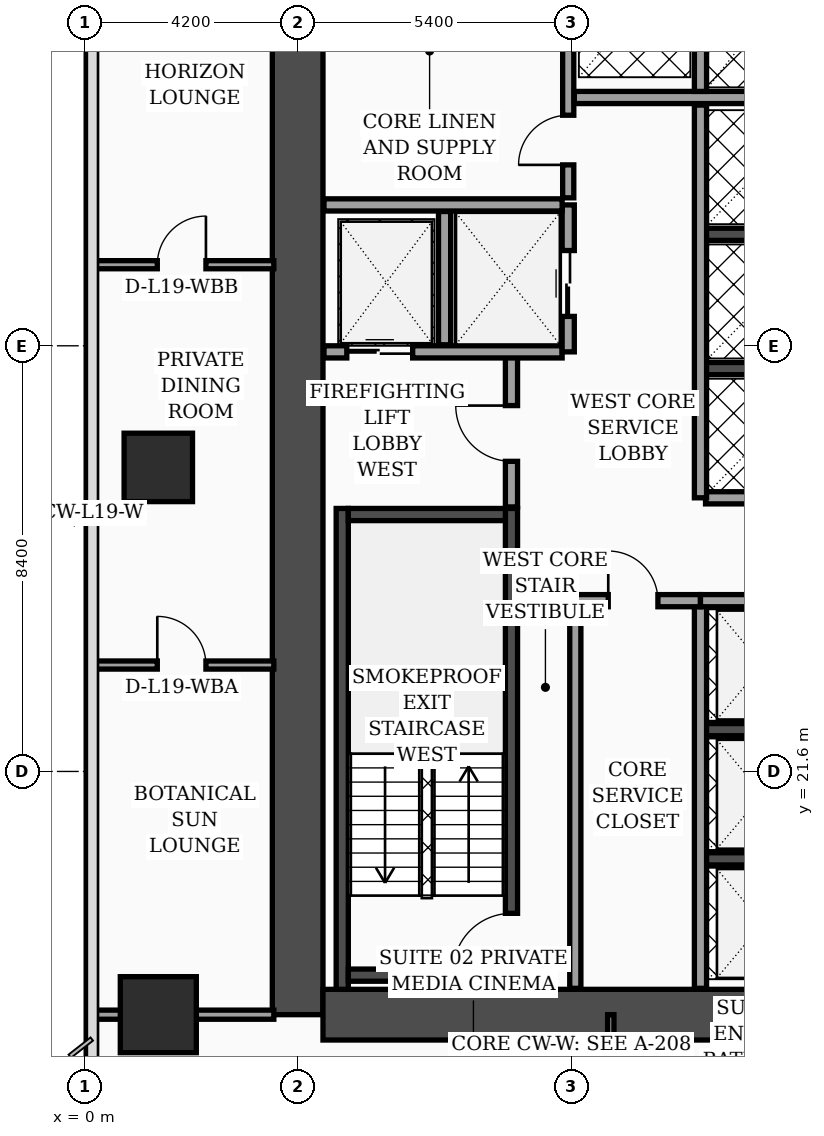
"""IFC4 building model, lengths in metres.
Left out: names, types, materials, properties, quantities, classifications, styles, units other than length and angle.
Written with IfcOpenShell. Run it as: python <this file> out.ifc"""

import sys

from ifc_helpers import new_model, si_unit, direction, frame, frame_2d, origin, origin_2d, place, context, subcontext, project, spatial, rectangle, extrude, element, fill, save


model = new_model("IFC4")
c1 = context("Model", 3, precision=1e-05, world=origin(), true_north=direction((0.0, 1.0)))
c2 = subcontext(c1, "Body", "Model", "MODEL_VIEW")
j1 = project(units=[si_unit("LENGTHUNIT", "METRE"), si_unit("PLANEANGLEUNIT", "RADIAN")], contexts=[c1])
p1 = place(None, origin())
s1 = spatial("IfcSite", under=j1, at=p1, CompositionType="ELEMENT")
p2 = place(p1, origin())
s2 = spatial("IfcBuilding", under=s1, at=p2, CompositionType="ELEMENT")
p3 = place(p2, frame((0.0, 0.0, 81.2)))
s3 = spatial("IfcBuildingStorey", under=s2, at=p3, CompositionType="ELEMENT", Elevation=81.2)
p4 = place(p3, frame((4.2, 16.8, 0.0), z_axis=(0.0, 0.0, 1.0), x_axis=(0.0, 1.0, 0.0)))
e1 = element("IfcWall", 1, at=p4, inside=s3, PredefinedType="SHEAR", context=c2, shape_type="SweptSolid", body=[
    extrude(rectangle(XDim=21.6, YDim=1.0, at=frame_2d((10.8, 0.0))), origin(), (0.0, 0.0, 1.0), 3.56),
])
p5 = place(p3, frame((4.7, 16.8, 0.0), z_axis=(0.0, 0.0, 1.0), x_axis=(1.0, 0.0, 0.0)))
e2 = element("IfcWall", 2, at=p5, inside=s3, PredefinedType="SHEAR", context=c2, shape_type="SweptSolid", body=[
    extrude(rectangle(XDim=9.8, YDim=1.0, at=frame_2d((4.9, 0.0))), origin(), (0.0, 0.0, 1.0), 3.56),
])
p6 = place(p3, frame((5.08, 17.3, 0.0), z_axis=(0.0, 0.0, 1.0), x_axis=(0.0, 1.0, 0.0)))
e3 = element("IfcWall", 3, at=p6, inside=s3, PredefinedType="SOLIDWALL", context=c2, shape_type="SweptSolid", body=[
    extrude(rectangle(XDim=9.49, YDim=0.24, at=frame_2d((4.745, 0.0))), origin(), (0.0, 0.0, 1.0), 3.56),
])
p7 = place(p3, frame((8.42, 17.3, 0.0), z_axis=(0.0, 0.0, 1.0), x_axis=(0.0, 1.0, 0.0)))
e4 = element("IfcWall", 4, at=p7, inside=s3, PredefinedType="SOLIDWALL", context=c2, shape_type="SweptSolid", body=[
    extrude(rectangle(XDim=9.49, YDim=0.24, at=frame_2d((4.745, 0.0))), origin(), (0.0, 0.0, 1.0), 3.56),
])
p8 = place(p7, frame((0.35, 0.0, 0.0)))
e5 = element("IfcOpeningElement", 5, at=p8, cuts=e4, PredefinedType="OPENING", context=c2, shape_type="SweptSolid", body=[
    extrude(rectangle(XDim=1.15, YDim=2.2, at=frame_2d((0.575, 1.1))), frame((0.0, 0.13, 0.0), z_axis=(0.0, -1.0, 0.0), x_axis=(1.0, 0.0, 0.0)), (0.0, 0.0, 1.0), 0.26),
])
for number, where, z_axis, x_axis in (
    (6, (5.2, 17.58, 0.0), (0.0, 0.0, 1.0), (1.0, 0.0, 0.0)),
    (7, (5.2, 26.67, 0.0), (0.0, 0.0, 1.0), (1.0, 0.0, 0.0)),
):
    element("IfcWall", number, at=place(p3, frame(where, z_axis=z_axis, x_axis=x_axis)), inside=s3, PredefinedType="SOLIDWALL", context=c2, shape_type="SweptSolid", body=[
        extrude(rectangle(XDim=3.1, YDim=0.24, at=frame_2d((1.55, 0.0))), origin(), (0.0, 0.0, 1.0), 3.56),
    ])
for number, where, z_axis, x_axis in (
    (8, (12.18, 19.875, 0.0), (0.0, 0.0, 1.0), (1.0, 0.0, 0.0)),
    (9, (12.18, 22.425, 0.0), (0.0, 0.0, 1.0), (1.0, 0.0, 0.0)),
    (10, (12.18, 29.55, 0.0), (0.0, 0.0, 1.0), (1.0, 0.0, 0.0)),
    (11, (12.18, 32.2, 0.0), (0.0, 0.0, 1.0), (1.0, 0.0, 0.0)),
):
    element("IfcWall", number, at=place(p3, frame(where, z_axis=z_axis, x_axis=x_axis)), inside=s3, PredefinedType="SOLIDWALL", context=c2, shape_type="SweptSolid", body=[
        extrude(rectangle(XDim=2.32, YDim=0.24, at=frame_2d((1.16, 0.0))), origin(), (0.0, 0.0, 1.0), 3.56),
    ])
p9 = place(p3, frame((1.45, 16.8, 0.0), z_axis=(0.0, 0.0, 1.0), x_axis=(1.0, 0.0, 0.0)))
e12 = element("IfcColumn", 12, at=p9, inside=s3, PredefinedType="COLUMN", context=c2, shape_type="SweptSolid", body=[
    extrude(rectangle(XDim=1.5, YDim=1.5, at=origin_2d()), origin(), (0.0, 0.0, 1.0), 3.56),
])
p10 = place(p3, frame((1.45, 27.6, 0.0), z_axis=(0.0, 0.0, 1.0), x_axis=(1.0, 0.0, 0.0)))
e13 = element("IfcColumn", 13, at=p10, inside=s3, PredefinedType="COLUMN", context=c2, shape_type="SweptSolid", body=[
    extrude(rectangle(XDim=1.35, YDim=1.35, at=origin_2d()), origin(), (0.0, 0.0, 1.0), 3.56),
])
p11 = place(p3, frame((8.42, 26.82, 0.0), z_axis=(0.0, 0.0, 1.0), x_axis=(0.0, 1.0, 0.0)))
e14 = element("IfcWall", 14, at=p11, inside=s3, PredefinedType="SOLIDWALL", context=c2, shape_type="SweptSolid", body=[
    extrude(rectangle(XDim=3.0, YDim=0.24, at=frame_2d((1.5, 0.0))), origin(), (0.0, 0.0, 1.0), 3.56),
])
p12 = place(p11, frame((0.9, 0.0, 0.0)))
e15 = element("IfcOpeningElement", 15, at=p12, cuts=e14, PredefinedType="OPENING", context=c2, shape_type="SweptSolid", body=[
    extrude(rectangle(XDim=1.1, YDim=2.2, at=frame_2d((0.55, 1.1))), frame((0.0, 0.13, 0.0), z_axis=(0.0, -1.0, 0.0), x_axis=(1.0, 0.0, 0.0)), (0.0, 0.0, 1.0), 0.26),
])
p13 = place(p3, frame((4.72, 29.88, 0.0), z_axis=(0.0, 0.0, 1.0), x_axis=(1.0, 0.0, 0.0)))
e16 = element("IfcWall", 16, at=p13, inside=s3, PredefinedType="SOLIDWALL", context=c2, shape_type="SweptSolid", body=[
    extrude(rectangle(XDim=4.7, YDim=0.24, at=frame_2d((2.35, 0.0))), origin(), (0.0, 0.0, 1.0), 3.56),
])
p14 = place(p13, frame((0.45, 0.0, 0.0)))
e17 = element("IfcOpeningElement", 17, at=p14, cuts=e16, PredefinedType="OPENING", context=c2, shape_type="SweptSolid", body=[
    extrude(rectangle(XDim=1.3, YDim=2.35, at=frame_2d((0.65, 1.175))), frame((0.0, 0.13, 0.0), z_axis=(0.0, -1.0, 0.0), x_axis=(1.0, 0.0, 0.0)), (0.0, 0.0, 1.0), 0.26),
])
p15 = place(p3, frame((7.1, 30.02, 0.0), z_axis=(0.0, 0.0, 1.0), x_axis=(0.0, 1.0, 0.0)))
e18 = element("IfcWall", 18, at=p15, inside=s3, PredefinedType="SOLIDWALL", context=c2, shape_type="SweptSolid", body=[
    extrude(rectangle(XDim=2.63, YDim=0.24, at=frame_2d((1.315, 0.0))), origin(), (0.0, 0.0, 1.0), 3.56),
])
p16 = place(p3, frame((9.54, 29.88, 0.0), z_axis=(0.0, 0.0, 1.0), x_axis=(0.0, 1.0, 0.0)))
e19 = element("IfcWall", 19, at=p16, inside=s3, PredefinedType="SOLIDWALL", context=c2, shape_type="SweptSolid", body=[
    extrude(rectangle(XDim=2.9, YDim=0.24, at=frame_2d((1.45, 0.0))), origin(), (0.0, 0.0, 1.0), 3.56),
])
p17 = place(p16, frame((0.7, 0.0, 0.0)))
e20 = element("IfcOpeningElement", 20, at=p17, cuts=e19, PredefinedType="OPENING", context=c2, shape_type="SweptSolid", body=[
    extrude(rectangle(XDim=1.3, YDim=2.35, at=frame_2d((0.65, 1.175))), frame((0.0, 0.13, 0.0), z_axis=(0.0, -1.0, 0.0), x_axis=(1.0, 0.0, 0.0)), (0.0, 0.0, 1.0), 0.26),
])
p18 = place(p3, frame((4.72, 32.78, 0.0), z_axis=(0.0, 0.0, 1.0), x_axis=(1.0, 0.0, 0.0)))
e21 = element("IfcWall", 21, at=p18, inside=s3, PredefinedType="SOLIDWALL", context=c2, shape_type="SweptSolid", body=[
    extrude(rectangle(XDim=4.7, YDim=0.24, at=frame_2d((2.35, 0.0))), origin(), (0.0, 0.0, 1.0), 3.56),
])
p19 = place(p3, frame((9.68, 17.32, 0.0), z_axis=(0.0, 0.0, 1.0), x_axis=(0.0, 1.0, 0.0)))
e22 = element("IfcWall", 22, at=p19, inside=s3, PredefinedType="SOLIDWALL", context=c2, shape_type="SweptSolid", body=[
    extrude(rectangle(XDim=7.68, YDim=0.22, at=frame_2d((3.84, 0.0))), origin(), (0.0, 0.0, 1.0), 3.56),
])
p20 = place(p3, frame((9.54, 32.92, 0.0), z_axis=(0.0, 0.0, 1.0), x_axis=(0.0, 1.0, 0.0)))
e23 = element("IfcWall", 23, at=p20, inside=s3, PredefinedType="SOLIDWALL", context=c2, shape_type="SweptSolid", body=[
    extrude(rectangle(XDim=4.96, YDim=0.22, at=frame_2d((2.48, 0.0))), origin(), (0.0, 0.0, 1.0), 3.56),
])
p21 = place(p20, frame((0.65, 0.0, 0.0)))
e24 = element("IfcOpeningElement", 24, at=p21, cuts=e23, PredefinedType="OPENING", context=c2, shape_type="SweptSolid", body=[
    extrude(rectangle(XDim=0.98, YDim=2.15, at=frame_2d((0.49, 1.075))), frame((0.0, 0.12, 0.0), z_axis=(0.0, -1.0, 0.0), x_axis=(1.0, 0.0, 0.0)), (0.0, 0.0, 1.0), 0.24),
])
p22 = place(p3, frame((12.15, 17.32, 0.0), z_axis=(0.0, 0.0, 1.0), x_axis=(0.0, 1.0, 0.0)))
e25 = element("IfcWall", 25, at=p22, inside=s3, PredefinedType="SOLIDWALL", context=c2, shape_type="SweptSolid", body=[
    extrude(rectangle(XDim=7.65, YDim=0.24, at=frame_2d((3.825, 0.0))), origin(), (0.0, 0.0, 1.0), 3.56),
])
p23 = place(p3, frame((9.68, 24.97, 0.0), z_axis=(0.0, 0.0, 1.0), x_axis=(1.0, 0.0, 0.0)))
e26 = element("IfcWall", 26, at=p23, inside=s3, PredefinedType="SOLIDWALL", context=c2, shape_type="SweptSolid", body=[
    extrude(rectangle(XDim=2.47, YDim=0.24, at=frame_2d((1.235, 0.0))), origin(), (0.0, 0.0, 1.0), 3.56),
])
p24 = place(p23, frame((0.65, 0.0, 0.0)))
e27 = element("IfcOpeningElement", 27, at=p24, cuts=e26, PredefinedType="OPENING", context=c2, shape_type="SweptSolid", body=[
    extrude(rectangle(XDim=0.98, YDim=2.15, at=frame_2d((0.49, 1.075))), frame((0.0, 0.13, 0.0), z_axis=(0.0, -1.0, 0.0), x_axis=(1.0, 0.0, 0.0)), (0.0, 0.0, 1.0), 0.26),
])
p25 = place(p3, frame((12.15, 24.97, 0.0), z_axis=(0.0, 0.0, 1.0), x_axis=(1.0, 0.0, 0.0)))
e28 = element("IfcWall", 28, at=p25, inside=s3, PredefinedType="SOLIDWALL", context=c2, shape_type="SweptSolid", body=[
    extrude(rectangle(XDim=2.33, YDim=0.24, at=frame_2d((1.165, 0.0))), origin(), (0.0, 0.0, 1.0), 2.84),
])
p26 = place(p3, frame((12.25, 27.0, 0.0), z_axis=(0.0, 0.0, 1.0), x_axis=(1.0, 0.0, 0.0)))
e29 = element("IfcWall", 29, at=p26, inside=s3, PredefinedType="SOLIDWALL", context=c2, shape_type="SweptSolid", body=[
    extrude(rectangle(XDim=2.23, YDim=0.24, at=frame_2d((1.115, 0.0))), origin(), (0.0, 0.0, 1.0), 3.56),
])
p27 = place(p3, frame((12.15, 27.0, 0.0), z_axis=(0.0, 0.0, 1.0), x_axis=(0.0, 1.0, 0.0)))
e30 = element("IfcWall", 30, at=p27, inside=s3, PredefinedType="SOLIDWALL", context=c2, shape_type="SweptSolid", body=[
    extrude(rectangle(XDim=7.75, YDim=0.24, at=frame_2d((3.875, 0.0))), origin(), (0.0, 0.0, 1.0), 3.56),
])
p28 = place(p3, frame((9.66, 34.9, 0.0), z_axis=(0.0, 0.0, 1.0), x_axis=(1.0, 0.0, 0.0)))
e31 = element("IfcWall", 31, at=p28, inside=s3, PredefinedType="SOLIDWALL", context=c2, shape_type="SweptSolid", body=[
    extrude(rectangle(XDim=4.82, YDim=0.24, at=frame_2d((2.41, 0.0))), origin(), (0.0, 0.0, 1.0), 3.56),
])
p29 = place(p3, frame((12.15, 35.02, 0.0), z_axis=(0.0, 0.0, 1.0), x_axis=(0.0, 1.0, 0.0)))
e32 = element("IfcWall", 32, at=p29, inside=s3, PredefinedType="SOLIDWALL", context=c2, shape_type="SweptSolid", body=[
    extrude(rectangle(XDim=2.86, YDim=0.24, at=frame_2d((1.43, 0.0))), origin(), (0.0, 0.0, 1.0), 3.56),
])
p30 = place(p3, frame((0.08, 23.7, 0.0), z_axis=(0.0, 0.0, 1.0), x_axis=(1.0, 0.0, 0.0)))
e33 = element("IfcWall", 33, at=p30, inside=s3, PredefinedType="PARTITIONING", context=c2, shape_type="SweptSolid", body=[
    extrude(rectangle(XDim=3.65, YDim=0.16, at=frame_2d((1.825, 0.0))), origin(), (0.0, 0.0, 1.0), 3.04),
])
p31 = place(p30, frame((1.35, 0.0, 0.0)))
e34 = element("IfcOpeningElement", 34, at=p31, cuts=e33, PredefinedType="OPENING", context=c2, shape_type="SweptSolid", body=[
    extrude(rectangle(XDim=0.96, YDim=2.2, at=frame_2d((0.48, 1.1))), frame((0.0, 0.09, 0.0), z_axis=(0.0, -1.0, 0.0), x_axis=(1.0, 0.0, 0.0)), (0.0, 0.0, 1.0), 0.18),
])
p32 = place(p3, frame((0.08, 31.6, 0.0), z_axis=(0.0, 0.0, 1.0), x_axis=(1.0, 0.0, 0.0)))
e35 = element("IfcWall", 35, at=p32, inside=s3, PredefinedType="PARTITIONING", context=c2, shape_type="SweptSolid", body=[
    extrude(rectangle(XDim=3.65, YDim=0.16, at=frame_2d((1.825, 0.0))), origin(), (0.0, 0.0, 1.0), 3.04),
])
p33 = place(p32, frame((1.35, 0.0, 0.0)))
e36 = element("IfcOpeningElement", 36, at=p33, cuts=e35, PredefinedType="OPENING", context=c2, shape_type="SweptSolid", body=[
    extrude(rectangle(XDim=0.96, YDim=2.2, at=frame_2d((0.48, 1.1))), frame((0.0, 0.09, 0.0), z_axis=(0.0, -1.0, 0.0), x_axis=(1.0, 0.0, 0.0)), (0.0, 0.0, 1.0), 0.18),
])
p34 = place(p3, frame((0.08, 16.8, 0.0), z_axis=(0.0, 0.0, 1.0), x_axis=(1.0, 0.0, 0.0)))
e37 = element("IfcWall", 37, at=p34, inside=s3, PredefinedType="PARTITIONING", context=c2, shape_type="SweptSolid", body=[
    extrude(rectangle(XDim=3.65, YDim=0.18, at=frame_2d((1.825, 0.0))), origin(), (0.0, 0.0, 1.0), 2.84),
])
p35 = place(p3, frame((10.38, 14.75, 0.0), z_axis=(0.0, 0.0, 1.0), x_axis=(0.0, 1.0, 0.0)))
e38 = element("IfcWall", 38, at=p35, inside=s3, PredefinedType="PARTITIONING", context=c2, shape_type="SweptSolid", body=[
    extrude(rectangle(XDim=2.05, YDim=0.125, at=frame_2d((1.025, 0.0))), origin(), (0.0, 0.0, 1.0), 3.56),
])
p36 = place(p12, origin())
e39 = element("IfcDoor", 39, at=p36, inside=s3, OperationType="SINGLE_SWING_RIGHT", PredefinedType="DOOR", context=c2, shape_type="SweptSolid", body=[
    extrude(rectangle(XDim=1.1, YDim=2.2, at=frame_2d((0.55, 1.1))), frame((0.0, 0.025, 0.0), z_axis=(0.0, -1.0, 0.0), x_axis=(1.0, 0.0, 0.0)), (0.0, 0.0, 1.0), 0.05),
])
fill(e15, e39)
p37 = place(p14, origin())
e40 = element("IfcDoor", 40, at=p37, inside=s3, OperationType="DOUBLE_DOOR_SLIDING", PredefinedType="DOOR", context=c2, shape_type="SweptSolid", body=[
    extrude(rectangle(XDim=1.3, YDim=2.35, at=frame_2d((0.65, 1.175))), frame((0.0, 0.025, 0.0), z_axis=(0.0, -1.0, 0.0), x_axis=(1.0, 0.0, 0.0)), (0.0, 0.0, 1.0), 0.05),
])
fill(e17, e40)
p38 = place(p17, origin())
e41 = element("IfcDoor", 41, at=p38, inside=s3, OperationType="DOUBLE_DOOR_SLIDING", PredefinedType="DOOR", context=c2, shape_type="SweptSolid", body=[
    extrude(rectangle(XDim=1.3, YDim=2.35, at=frame_2d((0.65, 1.175))), frame((0.0, 0.025, 0.0), z_axis=(0.0, -1.0, 0.0), x_axis=(1.0, 0.0, 0.0)), (0.0, 0.0, 1.0), 0.05),
])
fill(e20, e41)
p39 = place(p21, origin())
e42 = element("IfcDoor", 42, at=p39, inside=s3, OperationType="SINGLE_SWING_LEFT", PredefinedType="DOOR", context=c2, shape_type="SweptSolid", body=[
    extrude(rectangle(XDim=0.98, YDim=2.15, at=frame_2d((0.49, 1.075))), frame((0.0, 0.025, 0.0), z_axis=(0.0, -1.0, 0.0), x_axis=(1.0, 0.0, 0.0)), (0.0, 0.0, 1.0), 0.05),
])
fill(e24, e42)
p40 = place(p24, origin())
e43 = element("IfcDoor", 43, at=p40, inside=s3, OperationType="SINGLE_SWING_LEFT", PredefinedType="DOOR", context=c2, shape_type="SweptSolid", body=[
    extrude(rectangle(XDim=0.98, YDim=2.15, at=frame_2d((0.49, 1.075))), frame((0.0, 0.025, 0.0), z_axis=(0.0, -1.0, 0.0), x_axis=(1.0, 0.0, 0.0)), (0.0, 0.0, 1.0), 0.05),
])
fill(e27, e43)
p41 = place(p31, origin())
e44 = element("IfcDoor", 44, at=p41, inside=s3, OperationType="SINGLE_SWING_LEFT", PredefinedType="DOOR", context=c2, shape_type="SweptSolid", body=[
    extrude(rectangle(XDim=0.96, YDim=2.2, at=frame_2d((0.48, 1.1))), frame((0.0, 0.025, 0.0), z_axis=(0.0, -1.0, 0.0), x_axis=(1.0, 0.0, 0.0)), (0.0, 0.0, 1.0), 0.05),
])
fill(e34, e44)
p42 = place(p33, origin())
e45 = element("IfcDoor", 45, at=p42, inside=s3, OperationType="SINGLE_SWING_RIGHT", PredefinedType="DOOR", context=c2, shape_type="SweptSolid", body=[
    extrude(rectangle(XDim=0.96, YDim=2.2, at=frame_2d((0.48, 1.1))), frame((0.0, 0.025, 0.0), z_axis=(0.0, -1.0, 0.0), x_axis=(1.0, 0.0, 0.0)), (0.0, 0.0, 1.0), 0.05),
])
fill(e36, e45)
p43 = place(p8, origin())
e46 = element("IfcDoor", 46, at=p43, inside=s3, OperationType="SINGLE_SWING_LEFT", PredefinedType="DOOR", context=c2, shape_type="SweptSolid", body=[
    extrude(rectangle(XDim=1.15, YDim=2.2, at=frame_2d((0.575, 1.1))), frame((0.0, 0.025, 0.0), z_axis=(0.0, -1.0, 0.0), x_axis=(1.0, 0.0, 0.0)), (0.0, 0.0, 1.0), 0.05),
])
fill(e5, e46)
save(model, sys.argv[1])
